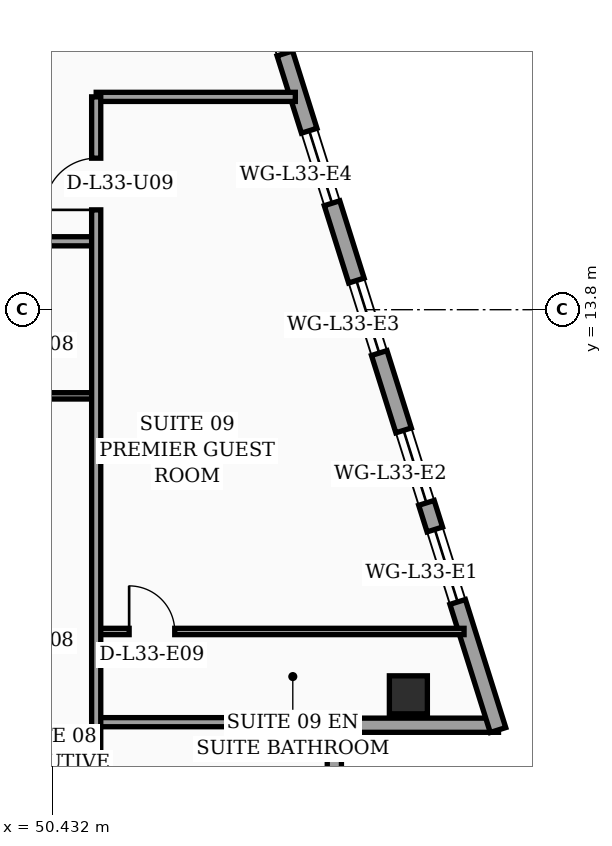
"""IFC4 building model, lengths in metres.
Left out: names, types, materials, properties, quantities, classifications, styles, units other than length and angle.
Written with IfcOpenShell. Run it as: python <this file> out.ifc"""

import sys

from ifc_helpers import new_model, si_unit, direction, frame, frame_2d, origin, origin_2d, place, context, subcontext, project, spatial, rectangle, hollow_rectangle, extrude, element, fill, save


model = new_model("IFC4")
c1 = context("Model", 3, precision=1e-05, world=origin(), true_north=direction((0.0, 1.0)))
c2 = subcontext(c1, "Body", "Model", "MODEL_VIEW")
j1 = project(units=[si_unit("LENGTHUNIT", "METRE"), si_unit("PLANEANGLEUNIT", "RADIAN")], contexts=[c1])
p1 = place(None, origin())
s1 = spatial("IfcSite", under=j1, at=p1, CompositionType="ELEMENT")
p2 = place(p1, origin())
s2 = spatial("IfcBuilding", under=s1, at=p2, CompositionType="ELEMENT")
p3 = place(p2, frame((0.0, 0.0, 135.4)))
s3 = spatial("IfcBuildingStorey", under=s2, at=p3, CompositionType="ELEMENT", Elevation=135.4)
p4 = place(p3, frame((57.461, 6.2, 0.0), z_axis=(0.0, 0.0, 1.0), x_axis=(1.0, 0.0, 0.0)))
e1 = element("IfcColumn", 1, at=p4, inside=s3, PredefinedType="COLUMN", context=c2, shape_type="SweptSolid", body=[
    extrude(hollow_rectangle(XDim=0.75, YDim=0.75, WallThickness=0.032, at=origin_2d()), origin(), (0.0, 0.0, 1.0), 3.52),
])
p5 = place(p3, frame((56.0, 2.52, 0.0), z_axis=(0.0, 0.0, 1.0), x_axis=(0.0, 1.0, 0.0)))
e2 = element("IfcWall", 2, at=p5, inside=s3, PredefinedType="SOLIDWALL", context=c2, shape_type="SweptSolid", body=[
    extrude(rectangle(XDim=2.94, YDim=0.28, at=frame_2d((1.47, 0.0))), origin(), (0.0, 0.0, 1.0), 3.02),
])
p6 = place(p3, frame((55.86, 5.6, 0.0), z_axis=(0.0, 0.0, 1.0), x_axis=(1.0, 0.0, 0.0)))
e3 = element("IfcWall", 3, at=p6, inside=s3, PredefinedType="SOLIDWALL", context=c2, shape_type="SweptSolid", body=[
    extrude(rectangle(XDim=3.38, YDim=0.28, at=frame_2d((1.69, 0.0))), origin(), (0.0, 0.0, 1.0), 3.02),
])
p7 = place(p3, frame((59.23, 5.505, 0.0), z_axis=(0.0, 0.0, 1.0), x_axis=(-0.300509063924, 0.953778958931, 0.0)))
e4 = element("IfcWall", 4, at=p7, inside=s3, PredefinedType="SOLIDWALL", context=c2, shape_type="SweptSolid", body=[
    extrude(rectangle(XDim=30.814, YDim=0.32, at=frame_2d((15.407, 0.0))), origin(), (0.0, 0.0, 1.0), 3.52),
])
p8 = place(p7, frame((18.796, 0.0, 0.0)))
e5 = element("IfcOpeningElement", 5, at=p8, cuts=e4, PredefinedType="OPENING", context=c2, shape_type="SweptSolid", body=[
    extrude(rectangle(XDim=1.4, YDim=2.25, at=frame_2d((0.7, 1.125))), frame((0.0, 0.17, 0.0), z_axis=(0.0, -1.0, 0.0), x_axis=(1.0, 0.0, 0.0)), (0.0, 0.0, 1.0), 0.34),
])
p9 = place(p7, frame((2.65, 0.0, 0.75)))
e6 = element("IfcOpeningElement", 6, at=p9, cuts=e4, PredefinedType="OPENING", context=c2, shape_type="SweptSolid", body=[
    extrude(rectangle(XDim=1.5, YDim=1.6, at=frame_2d((0.75, 0.8))), frame((0.0, 0.17, 0.0), z_axis=(0.0, -1.0, 0.0), x_axis=(1.0, 0.0, 0.0)), (0.0, 0.0, 1.0), 0.34),
])
p10 = place(p7, frame((4.7, 0.0, 0.75)))
e7 = element("IfcOpeningElement", 7, at=p10, cuts=e4, PredefinedType="OPENING", context=c2, shape_type="SweptSolid", body=[
    extrude(rectangle(XDim=1.5, YDim=1.6, at=frame_2d((0.75, 0.8))), frame((0.0, 0.17, 0.0), z_axis=(0.0, -1.0, 0.0), x_axis=(1.0, 0.0, 0.0)), (0.0, 0.0, 1.0), 0.34),
])
p11 = place(p7, frame((7.8, 0.0, 0.75)))
e8 = element("IfcOpeningElement", 8, at=p11, cuts=e4, PredefinedType="OPENING", context=c2, shape_type="SweptSolid", body=[
    extrude(rectangle(XDim=1.5, YDim=1.6, at=frame_2d((0.75, 0.8))), frame((0.0, 0.17, 0.0), z_axis=(0.0, -1.0, 0.0), x_axis=(1.0, 0.0, 0.0)), (0.0, 0.0, 1.0), 0.34),
])
p12 = place(p7, frame((10.9, 0.0, 0.75)))
e9 = element("IfcOpeningElement", 9, at=p12, cuts=e4, PredefinedType="OPENING", context=c2, shape_type="SweptSolid", body=[
    extrude(rectangle(XDim=1.5, YDim=1.6, at=frame_2d((0.75, 0.8))), frame((0.0, 0.17, 0.0), z_axis=(0.0, -1.0, 0.0), x_axis=(1.0, 0.0, 0.0)), (0.0, 0.0, 1.0), 0.34),
])
p13 = place(p7, frame((14.0, 0.0, 0.75)))
e10 = element("IfcOpeningElement", 10, at=p13, cuts=e4, PredefinedType="OPENING", context=c2, shape_type="SweptSolid", body=[
    extrude(rectangle(XDim=1.5, YDim=1.6, at=frame_2d((0.75, 0.8))), frame((0.0, 0.17, 0.0), z_axis=(0.0, -1.0, 0.0), x_axis=(1.0, 0.0, 0.0)), (0.0, 0.0, 1.0), 0.34),
])
p14 = place(p7, frame((16.55, 0.0, 0.75)))
e11 = element("IfcOpeningElement", 11, at=p14, cuts=e4, PredefinedType="OPENING", context=c2, shape_type="SweptSolid", body=[
    extrude(rectangle(XDim=1.5, YDim=1.6, at=frame_2d((0.75, 0.8))), frame((0.0, 0.17, 0.0), z_axis=(0.0, -1.0, 0.0), x_axis=(1.0, 0.0, 0.0)), (0.0, 0.0, 1.0), 0.34),
])
p15 = place(p7, frame((20.75, 0.0, 0.75)))
e12 = element("IfcOpeningElement", 12, at=p15, cuts=e4, PredefinedType="OPENING", context=c2, shape_type="SweptSolid", body=[
    extrude(rectangle(XDim=1.5, YDim=1.6, at=frame_2d((0.75, 0.8))), frame((0.0, 0.17, 0.0), z_axis=(0.0, -1.0, 0.0), x_axis=(1.0, 0.0, 0.0)), (0.0, 0.0, 1.0), 0.34),
])
p16 = place(p7, frame((23.3, 0.0, 0.75)))
e13 = element("IfcOpeningElement", 13, at=p16, cuts=e4, PredefinedType="OPENING", context=c2, shape_type="SweptSolid", body=[
    extrude(rectangle(XDim=1.5, YDim=1.6, at=frame_2d((0.75, 0.8))), frame((0.0, 0.17, 0.0), z_axis=(0.0, -1.0, 0.0), x_axis=(1.0, 0.0, 0.0)), (0.0, 0.0, 1.0), 0.34),
])
p17 = place(p7, frame((26.4, 0.0, 0.75)))
e14 = element("IfcOpeningElement", 14, at=p17, cuts=e4, PredefinedType="OPENING", context=c2, shape_type="SweptSolid", body=[
    extrude(rectangle(XDim=1.5, YDim=1.6, at=frame_2d((0.75, 0.8))), frame((0.0, 0.17, 0.0), z_axis=(0.0, -1.0, 0.0), x_axis=(1.0, 0.0, 0.0)), (0.0, 0.0, 1.0), 0.34),
])
p18 = place(p3, frame((49.37, 12.1, 0.0), z_axis=(0.0, 0.0, 1.0), x_axis=(1.0, 0.0, 0.0)))
e15 = element("IfcWall", 15, at=p18, inside=s3, PredefinedType="PARTITIONING", context=c2, shape_type="SweptSolid", body=[
    extrude(rectangle(XDim=1.93, YDim=0.125, at=frame_2d((0.965, 0.0))), origin(), (0.0, 0.0, 1.0), 3.52),
])
p19 = place(p3, frame((32.4, 15.15, 0.0), z_axis=(0.0, 0.0, 1.0), x_axis=(1.0, 0.0, 0.0)))
e16 = element("IfcWall", 16, at=p19, inside=s3, PredefinedType="PARTITIONING", context=c2, shape_type="SweptSolid", body=[
    extrude(rectangle(XDim=18.9, YDim=0.18, at=frame_2d((9.45, 0.0))), origin(), (0.0, 0.0, 1.0), 2.82),
])
p20 = place(p19, frame((0.6, 0.0, 0.0)))
e17 = element("IfcOpeningElement", 17, at=p20, cuts=e16, PredefinedType="OPENING", context=c2, shape_type="SweptSolid", body=[
    extrude(rectangle(XDim=1.02, YDim=2.2, at=frame_2d((0.51, 1.1))), frame((0.0, 0.1, 0.0), z_axis=(0.0, -1.0, 0.0), x_axis=(1.0, 0.0, 0.0)), (0.0, 0.0, 1.0), 0.2),
])
p21 = place(p19, frame((5.45, 0.0, 0.0)))
e18 = element("IfcOpeningElement", 18, at=p21, cuts=e16, PredefinedType="OPENING", context=c2, shape_type="SweptSolid", body=[
    extrude(rectangle(XDim=1.02, YDim=2.2, at=frame_2d((0.51, 1.1))), frame((0.0, 0.1, 0.0), z_axis=(0.0, -1.0, 0.0), x_axis=(1.0, 0.0, 0.0)), (0.0, 0.0, 1.0), 0.2),
])
p22 = place(p19, frame((10.41, 0.0, 0.0)))
e19 = element("IfcOpeningElement", 19, at=p22, cuts=e16, PredefinedType="OPENING", context=c2, shape_type="SweptSolid", body=[
    extrude(rectangle(XDim=1.02, YDim=2.2, at=frame_2d((0.51, 1.1))), frame((0.0, 0.1, 0.0), z_axis=(0.0, -1.0, 0.0), x_axis=(1.0, 0.0, 0.0)), (0.0, 0.0, 1.0), 0.2),
])
p23 = place(p19, frame((15.08, 0.0, 0.0)))
e20 = element("IfcOpeningElement", 20, at=p23, cuts=e16, PredefinedType="OPENING", context=c2, shape_type="SweptSolid", body=[
    extrude(rectangle(XDim=1.02, YDim=2.2, at=frame_2d((0.51, 1.1))), frame((0.0, 0.1, 0.0), z_axis=(0.0, -1.0, 0.0), x_axis=(1.0, 0.0, 0.0)), (0.0, 0.0, 1.0), 0.2),
])
p24 = place(p3, frame((51.3, 7.45, 0.0), z_axis=(0.0, 0.0, 1.0), x_axis=(1.0, 0.0, 0.0)))
e21 = element("IfcWall", 21, at=p24, inside=s3, PredefinedType="PARTITIONING", context=c2, shape_type="SweptSolid", body=[
    extrude(rectangle(XDim=7.26, YDim=0.125, at=frame_2d((3.63, 0.0))), origin(), (0.0, 0.0, 1.0), 3.02),
])
p25 = place(p24, frame((0.65, 0.0, 0.0)))
e22 = element("IfcOpeningElement", 22, at=p25, cuts=e21, PredefinedType="OPENING", context=c2, shape_type="SweptSolid", body=[
    extrude(rectangle(XDim=0.9, YDim=2.15, at=frame_2d((0.45, 1.075))), frame((0.0, 0.073, 0.0), z_axis=(0.0, -1.0, 0.0), x_axis=(1.0, 0.0, 0.0)), (0.0, 0.0, 1.0), 0.145),
])
p26 = place(p3, frame((51.3, 5.66, 0.0), z_axis=(0.0, 0.0, 1.0), x_axis=(1.0, 0.0, 0.0)))
e23 = element("IfcWall", 23, at=p26, inside=s3, PredefinedType="PARTITIONING", context=c2, shape_type="SweptSolid", body=[
    extrude(rectangle(XDim=4.7, YDim=0.18, at=frame_2d((2.35, 0.0))), origin(), (0.0, 0.0, 1.0), 3.02),
])
p27 = place(p3, frame((51.3, 18.0, 0.0), z_axis=(0.0, 0.0, 1.0), x_axis=(1.0, 0.0, 0.0)))
e24 = element("IfcWall", 24, at=p27, inside=s3, PredefinedType="PARTITIONING", context=c2, shape_type="SweptSolid", body=[
    extrude(rectangle(XDim=3.93, YDim=0.18, at=frame_2d((1.965, 0.0))), origin(), (0.0, 0.0, 1.0), 3.02),
])
p28 = place(p3, frame((51.3, 2.44, 0.0), z_axis=(0.0, 0.0, 1.0), x_axis=(0.0, 1.0, 0.0)))
e25 = element("IfcWall", 25, at=p28, inside=s3, PredefinedType="PARTITIONING", context=c2, shape_type="SweptSolid", body=[
    extrude(rectangle(XDim=15.56, YDim=0.18, at=frame_2d((7.78, 0.0))), origin(), (0.0, 0.0, 1.0), 3.02),
])
p29 = place(p28, frame((13.33, 0.0, 0.0)))
e26 = element("IfcOpeningElement", 26, at=p29, cuts=e25, PredefinedType="OPENING", context=c2, shape_type="SweptSolid", body=[
    extrude(rectangle(XDim=1.02, YDim=2.2, at=frame_2d((0.51, 1.1))), frame((0.0, 0.1, 0.0), z_axis=(0.0, -1.0, 0.0), x_axis=(1.0, 0.0, 0.0)), (0.0, 0.0, 1.0), 0.2),
])
p30 = place(p9, origin())
e27 = element("IfcWindow", 27, at=p30, inside=s3, PartitioningType="SINGLE_PANEL", PredefinedType="WINDOW", context=c2, shape_type="SweptSolid", body=[
    extrude(rectangle(XDim=1.5, YDim=1.6, at=frame_2d((0.75, 0.8))), frame((0.0, 0.03, 0.0), z_axis=(0.0, -1.0, 0.0), x_axis=(1.0, 0.0, 0.0)), (0.0, 0.0, 1.0), 0.06),
])
fill(e6, e27)
p31 = place(p10, origin())
e28 = element("IfcWindow", 28, at=p31, inside=s3, PartitioningType="SINGLE_PANEL", PredefinedType="WINDOW", context=c2, shape_type="SweptSolid", body=[
    extrude(rectangle(XDim=1.5, YDim=1.6, at=frame_2d((0.75, 0.8))), frame((0.0, 0.03, 0.0), z_axis=(0.0, -1.0, 0.0), x_axis=(1.0, 0.0, 0.0)), (0.0, 0.0, 1.0), 0.06),
])
fill(e7, e28)
p32 = place(p11, origin())
e29 = element("IfcWindow", 29, at=p32, inside=s3, PartitioningType="SINGLE_PANEL", PredefinedType="WINDOW", context=c2, shape_type="SweptSolid", body=[
    extrude(rectangle(XDim=1.5, YDim=1.6, at=frame_2d((0.75, 0.8))), frame((0.0, 0.03, 0.0), z_axis=(0.0, -1.0, 0.0), x_axis=(1.0, 0.0, 0.0)), (0.0, 0.0, 1.0), 0.06),
])
fill(e8, e29)
p33 = place(p12, origin())
e30 = element("IfcWindow", 30, at=p33, inside=s3, PartitioningType="SINGLE_PANEL", PredefinedType="WINDOW", context=c2, shape_type="SweptSolid", body=[
    extrude(rectangle(XDim=1.5, YDim=1.6, at=frame_2d((0.75, 0.8))), frame((0.0, 0.03, 0.0), z_axis=(0.0, -1.0, 0.0), x_axis=(1.0, 0.0, 0.0)), (0.0, 0.0, 1.0), 0.06),
])
fill(e9, e30)
p34 = place(p13, origin())
e31 = element("IfcWindow", 31, at=p34, inside=s3, PartitioningType="SINGLE_PANEL", PredefinedType="WINDOW", context=c2, shape_type="SweptSolid", body=[
    extrude(rectangle(XDim=1.5, YDim=1.6, at=frame_2d((0.75, 0.8))), frame((0.0, 0.03, 0.0), z_axis=(0.0, -1.0, 0.0), x_axis=(1.0, 0.0, 0.0)), (0.0, 0.0, 1.0), 0.06),
])
fill(e10, e31)
p35 = place(p25, origin())
e32 = element("IfcDoor", 32, at=p35, inside=s3, OperationType="SINGLE_SWING_LEFT", PredefinedType="DOOR", context=c2, shape_type="SweptSolid", body=[
    extrude(rectangle(XDim=0.9, YDim=2.15, at=frame_2d((0.45, 1.075))), frame((0.0, 0.025, 0.0), z_axis=(0.0, -1.0, 0.0), x_axis=(1.0, 0.0, 0.0)), (0.0, 0.0, 1.0), 0.05),
])
fill(e22, e32)
p36 = place(p29, origin())
e33 = element("IfcDoor", 33, at=p36, inside=s3, OperationType="SINGLE_SWING_LEFT", PredefinedType="DOOR", context=c2, shape_type="SweptSolid", body=[
    extrude(rectangle(XDim=1.02, YDim=2.2, at=frame_2d((0.51, 1.1))), frame((0.0, 0.025, 0.0), z_axis=(0.0, -1.0, 0.0), x_axis=(1.0, 0.0, 0.0)), (0.0, 0.0, 1.0), 0.05),
])
fill(e26, e33)
save(model, sys.argv[1])
